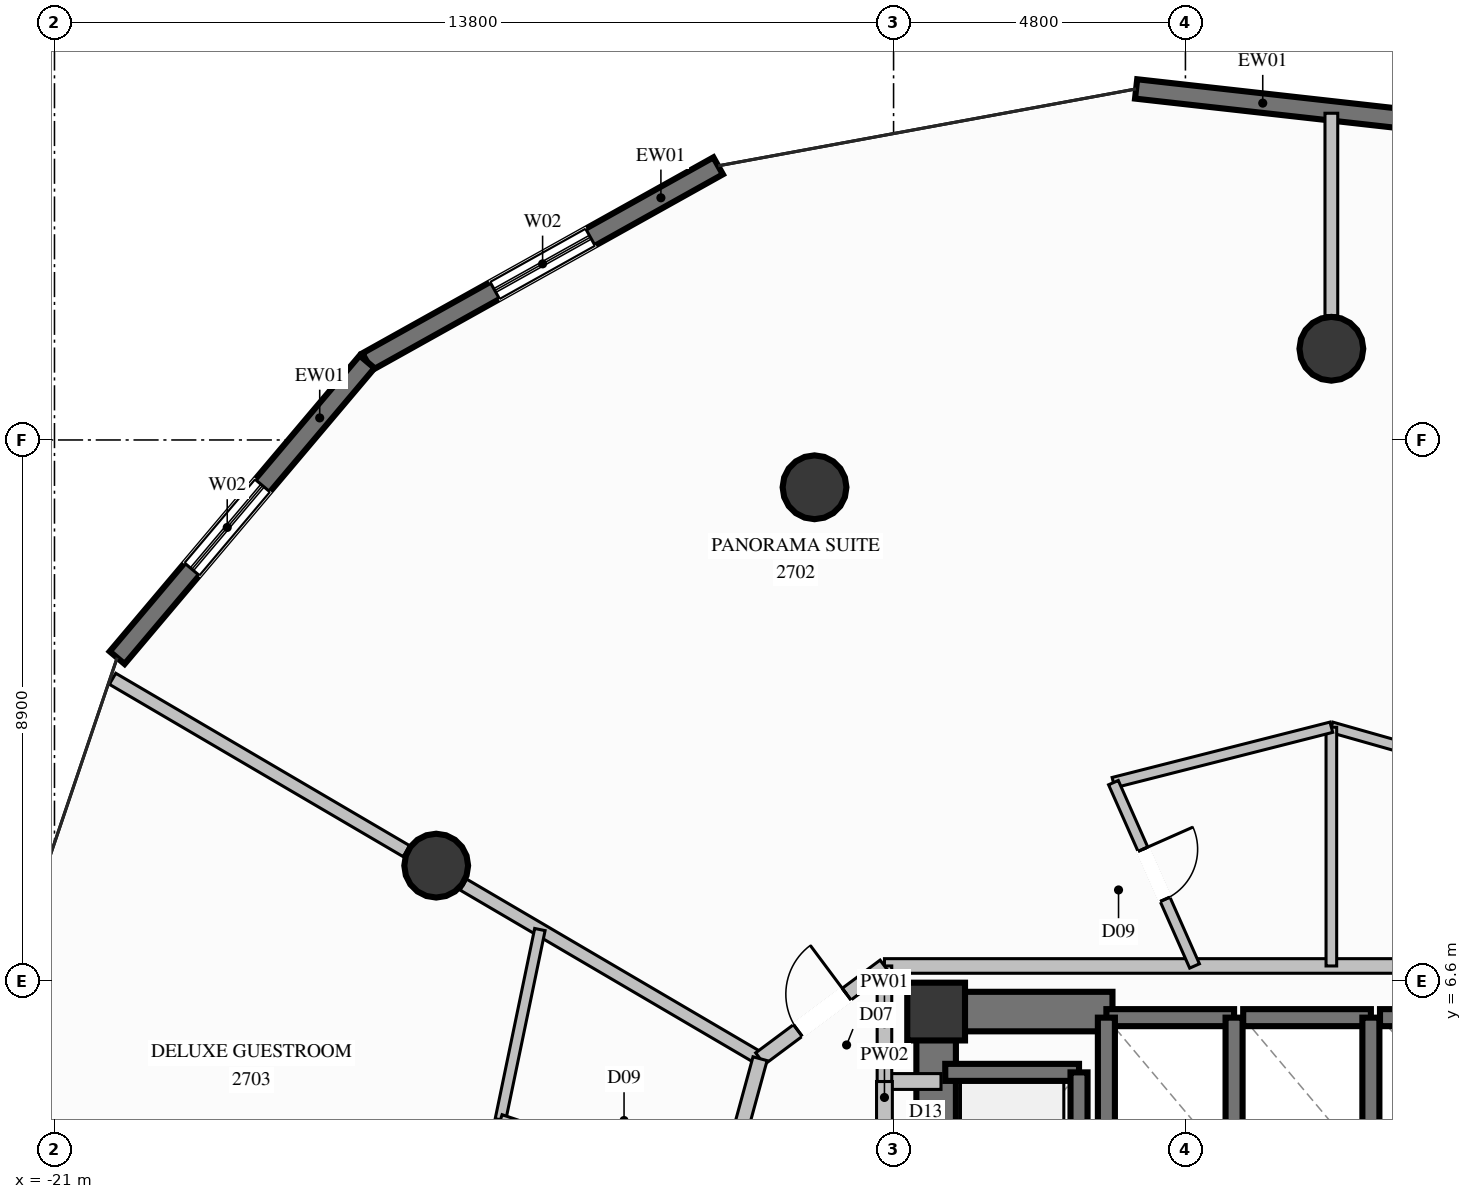
"""IFC4 building model, lengths in metres.
Left out: names, types, materials, properties, quantities, classifications, styles, units other than length and angle.
Written with IfcOpenShell. Run it as: python <this file> out.ifc"""

import sys

from ifc_helpers import new_model, si_unit, direction, frame, frame_2d, origin, origin_2d, place, context, subcontext, project, spatial, rectangle, circle, extrude, element, fill, save


model = new_model("IFC4")
c1 = context("Model", 3, precision=1e-05, world=origin(), true_north=direction((0.0, 1.0)))
c2 = subcontext(c1, "Body", "Model", "MODEL_VIEW")
j1 = project(units=[si_unit("LENGTHUNIT", "METRE"), si_unit("PLANEANGLEUNIT", "RADIAN")], contexts=[c1])
p1 = place(None, origin())
s1 = spatial("IfcSite", under=j1, at=p1, CompositionType="ELEMENT")
p2 = place(p1, origin())
s2 = spatial("IfcBuilding", under=s1, at=p2, CompositionType="ELEMENT")
p3 = place(p2, frame((0.0, 0.0, 102.6)))
s3 = spatial("IfcBuildingStorey", under=s2, at=p3, CompositionType="ELEMENT", Elevation=102.6)
p4 = place(p3, frame((-6.5, 6.1, 0.0), z_axis=(0.0, 0.0, 1.0), x_axis=(1.0, 0.0, 0.0)))
e1 = element("IfcColumn", 1, at=p4, inside=s3, PredefinedType="COLUMN", context=c2, shape_type="SweptSolid", body=[
    extrude(rectangle(XDim=0.95, YDim=0.95, at=origin_2d()), origin(), (0.0, 0.0, 1.0), 3.6),
])
p5 = place(p3, frame((-6.175, 6.1, 0.0), z_axis=(0.0, 0.0, 1.0), x_axis=(1.0, 0.0, 0.0)))
e2 = element("IfcWall", 2, at=p5, inside=s3, PredefinedType="SHEAR", context=c2, shape_type="SweptSolid", body=[
    extrude(rectangle(XDim=2.575, YDim=0.65, at=frame_2d((1.288, 0.0))), origin(), (0.0, 0.0, 1.0), 3.6),
])
p6 = place(p3, frame((-6.5, 2.35, 0.0), z_axis=(0.0, 0.0, 1.0), x_axis=(0.0, 1.0, 0.0)))
e3 = element("IfcWall", 3, at=p6, inside=s3, PredefinedType="SHEAR", context=c2, shape_type="SweptSolid", body=[
    extrude(rectangle(XDim=4.075, YDim=0.65, at=frame_2d((2.038, 0.0))), origin(), (0.0, 0.0, 1.0), 3.6),
])
for number, where, z_axis, x_axis in (
    (4, (0.0, 17.0, 0.0), (0.0, 0.0, 1.0), (1.0, 0.0, 0.0)),
    (5, (-8.5, 14.722, 0.0), (0.0, 0.0, 1.0), (1.0, 0.0, 0.0)),
    (6, (-14.722, 8.5, 0.0), (0.0, 0.0, 1.0), (1.0, 0.0, 0.0)),
):
    element("IfcColumn", number, at=place(p3, frame(where, z_axis=z_axis, x_axis=x_axis)), inside=s3, PredefinedType="COLUMN", context=c2, shape_type="SweptSolid", body=[
        extrude(circle(Radius=0.525, at=origin_2d()), origin(), (0.0, 0.0, 1.0), 3.6),
    ])
p7 = place(p3, frame((-3.211, 21.273, 0.0), z_axis=(0.0, 0.0, 1.0), x_axis=(0.993784044115, -0.111325081016, 0.0)))
e7 = element("IfcWall", 7, at=p7, inside=s3, PredefinedType="SOLIDWALL", context=c2, shape_type="SweptSolid", body=[
    extrude(rectangle(XDim=7.347, YDim=0.32, at=frame_2d((3.673, 0.0))), origin(), (0.0, 0.0, 1.0), 3.35),
])
p8 = place(p7, frame((4.441, 0.0, 0.35)))
e8 = element("IfcOpeningElement", 8, at=p8, cuts=e7, PredefinedType="OPENING", context=c2, shape_type="SweptSolid", body=[
    extrude(rectangle(XDim=1.8, YDim=2.6, at=frame_2d((0.9, 1.3))), frame((0.0, 0.17, 0.0), z_axis=(0.0, -1.0, 0.0), x_axis=(1.0, 0.0, 0.0)), (0.0, 0.0, 1.0), 0.34),
])
p9 = place(p3, frame((-15.859, 16.785, 0.0), z_axis=(0.0, 0.0, 1.0), x_axis=(0.873166276034, 0.487422459882, 0.0)))
e9 = element("IfcWall", 9, at=p9, inside=s3, PredefinedType="SOLIDWALL", context=c2, shape_type="SweptSolid", body=[
    extrude(rectangle(XDim=6.613, YDim=0.32, at=frame_2d((3.306, 0.0))), origin(), (0.0, 0.0, 1.0), 3.35),
])
p10 = place(p9, frame((2.406, 0.0, 0.35)))
e10 = element("IfcOpeningElement", 10, at=p10, cuts=e9, PredefinedType="OPENING", context=c2, shape_type="SweptSolid", body=[
    extrude(rectangle(XDim=1.8, YDim=2.6, at=frame_2d((0.9, 1.3))), frame((0.0, 0.17, 0.0), z_axis=(0.0, -1.0, 0.0), x_axis=(1.0, 0.0, 0.0)), (0.0, 0.0, 1.0), 0.34),
])
p11 = place(p3, frame((-19.969, 11.919, 0.0), z_axis=(0.0, 0.0, 1.0), x_axis=(0.645278763483, 0.763947195425, 0.0)))
e11 = element("IfcWall", 11, at=p11, inside=s3, PredefinedType="SOLIDWALL", context=c2, shape_type="SweptSolid", body=[
    extrude(rectangle(XDim=6.369, YDim=0.32, at=frame_2d((3.185, 0.0))), origin(), (0.0, 0.0, 1.0), 3.35),
])
p12 = place(p11, frame((1.905, 0.0, 0.35)))
e12 = element("IfcOpeningElement", 12, at=p12, cuts=e11, PredefinedType="OPENING", context=c2, shape_type="SweptSolid", body=[
    extrude(rectangle(XDim=1.8, YDim=2.6, at=frame_2d((0.9, 1.3))), frame((0.0, 0.17, 0.0), z_axis=(0.0, -1.0, 0.0), x_axis=(1.0, 0.0, 0.0)), (0.0, 0.0, 1.0), 0.34),
])
p13 = place(p3, frame((-1.6, 6.0, 0.0), z_axis=(0.0, 0.0, 1.0), x_axis=(-1.0, 0.0, 0.0)))
e13 = element("IfcWall", 13, at=p13, inside=s3, PredefinedType="SOLIDWALL", context=c2, shape_type="SweptSolid", body=[
    extrude(rectangle(XDim=2.1, YDim=0.28, at=frame_2d((1.05, 0.0))), origin(), (0.0, 0.0, 1.0), 3.35),
])
for number, where, z_axis, x_axis in (
    (14, (-3.7, 6.0, 0.0), (0.0, 0.0, 1.0), (0.0, -1.0, 0.0)),
    (15, (-1.6, 3.5, 0.0), (0.0, 0.0, 1.0), (0.0, 1.0, 0.0)),
):
    element("IfcWall", number, at=place(p3, frame(where, z_axis=z_axis, x_axis=x_axis)), inside=s3, PredefinedType="SOLIDWALL", context=c2, shape_type="SweptSolid", body=[
        extrude(rectangle(XDim=2.5, YDim=0.28, at=frame_2d((1.25, 0.0))), origin(), (0.0, 0.0, 1.0), 3.35),
    ])
p14 = place(p3, frame((0.65, 6.0, 0.0), z_axis=(0.0, 0.0, 1.0), x_axis=(-1.0, 0.0, 0.0)))
e16 = element("IfcWall", 16, at=p14, inside=s3, PredefinedType="SOLIDWALL", context=c2, shape_type="SweptSolid", body=[
    extrude(rectangle(XDim=2.1, YDim=0.28, at=frame_2d((1.05, 0.0))), origin(), (0.0, 0.0, 1.0), 3.35),
])
p15 = place(p3, frame((0.65, 3.5, 0.0), z_axis=(0.0, 0.0, 1.0), x_axis=(0.0, 1.0, 0.0)))
e17 = element("IfcWall", 17, at=p15, inside=s3, PredefinedType="SOLIDWALL", context=c2, shape_type="SweptSolid", body=[
    extrude(rectangle(XDim=2.5, YDim=0.28, at=frame_2d((1.25, 0.0))), origin(), (0.0, 0.0, 1.0), 3.35),
])
p16 = place(p3, frame((3.0, 6.0, 0.0), z_axis=(0.0, 0.0, 1.0), x_axis=(-1.0, 0.0, 0.0)))
e18 = element("IfcWall", 18, at=p16, inside=s3, PredefinedType="SOLIDWALL", context=c2, shape_type="SweptSolid", body=[
    extrude(rectangle(XDim=2.2, YDim=0.28, at=frame_2d((1.1, 0.0))), origin(), (0.0, 0.0, 1.0), 3.35),
])
p17 = place(p3, frame((-4.15, 5.1, 0.0), z_axis=(0.0, 0.0, 1.0), x_axis=(-1.0, 0.0, 0.0)))
e19 = element("IfcWall", 19, at=p17, inside=s3, PredefinedType="SOLIDWALL", context=c2, shape_type="SweptSolid", body=[
    extrude(rectangle(XDim=2.2, YDim=0.28, at=frame_2d((1.1, 0.0))), origin(), (0.0, 0.0, 1.0), 3.35),
])
p18 = place(p3, frame((-4.15, 2.4, 0.0), z_axis=(0.0, 0.0, 1.0), x_axis=(0.0, 1.0, 0.0)))
e20 = element("IfcWall", 20, at=p18, inside=s3, PredefinedType="SOLIDWALL", context=c2, shape_type="SweptSolid", body=[
    extrude(rectangle(XDim=2.7, YDim=0.28, at=frame_2d((1.35, 0.0))), origin(), (0.0, 0.0, 1.0), 3.35),
])
p19 = place(p3, frame((-7.35, 4.95, 0.0), z_axis=(0.0, 0.0, 1.0), x_axis=(1.0, 0.0, 0.0)))
e21 = element("IfcWall", 21, at=p19, inside=s3, PredefinedType="PARTITIONING", context=c2, shape_type="SweptSolid", body=[
    extrude(rectangle(XDim=0.93, YDim=0.26, at=frame_2d((0.465, 0.0))), origin(), (0.0, 0.0, 1.0), 3.35),
])
p20 = place(p3, frame((-7.35, 2.55, 0.0), z_axis=(0.0, 0.0, 1.0), x_axis=(0.0, 1.0, 0.0)))
e22 = element("IfcWall", 22, at=p20, inside=s3, PredefinedType="PARTITIONING", context=c2, shape_type="SweptSolid", body=[
    extrude(rectangle(XDim=2.4, YDim=0.26, at=frame_2d((1.2, 0.0))), origin(), (0.0, 0.0, 1.0), 2.435),
])
p21 = place(p20, frame((0.775, 0.0, 0.0)))
e23 = element("IfcOpeningElement", 23, at=p21, cuts=e22, PredefinedType="OPENING", context=c2, shape_type="SweptSolid", body=[
    extrude(rectangle(XDim=0.85, YDim=2.05, at=frame_2d((0.425, 1.025))), frame((0.0, 0.14, 0.0), z_axis=(0.0, -1.0, 0.0), x_axis=(1.0, 0.0, 0.0)), (0.0, 0.0, 1.0), 0.28),
])
p22 = place(p3, frame((-7.35, 6.85, 0.0), z_axis=(0.0, 0.0, 1.0), x_axis=(1.0, 0.0, 0.0)))
e24 = element("IfcWall", 24, at=p22, inside=s3, PredefinedType="PARTITIONING", context=c2, shape_type="SweptSolid", body=[
    extrude(rectangle(XDim=14.7, YDim=0.24, at=frame_2d((7.35, 0.0))), origin(), (0.0, 0.0, 1.0), 2.435),
])
p23 = place(p3, frame((-7.35, 4.95, 0.0), z_axis=(0.0, 0.0, 1.0), x_axis=(0.0, 1.0, 0.0)))
e25 = element("IfcWall", 25, at=p23, inside=s3, PredefinedType="PARTITIONING", context=c2, shape_type="SweptSolid", body=[
    extrude(rectangle(XDim=1.9, YDim=0.24, at=frame_2d((0.95, 0.0))), origin(), (0.0, 0.0, 1.0), 2.435),
])
p24 = place(p3, frame((-9.396, 5.325, 0.0), z_axis=(0.0, 0.0, 1.0), x_axis=(-0.862467386777, 0.50611264235, 0.0)))
e26 = element("IfcWall", 26, at=p24, inside=s3, PredefinedType="PARTITIONING", context=c2, shape_type="SweptSolid", body=[
    extrude(rectangle(XDim=5.657, YDim=0.21, at=frame_2d((2.829, 0.0))), origin(), (0.0, 0.0, 1.0), 2.791),
])
p25 = place(p3, frame((-15.212, 8.738, 0.0), z_axis=(0.0, 0.0, 1.0), x_axis=(-0.862556345738, 0.505961016706, 0.0)))
e27 = element("IfcWall", 27, at=p25, inside=s3, PredefinedType="PARTITIONING", context=c2, shape_type="SweptSolid", body=[
    extrude(rectangle(XDim=5.603, YDim=0.21, at=frame_2d((2.802, 0.0))), origin(), (0.0, 0.0, 1.0), 3.35),
])
p26 = place(p3, frame((0.0, 10.776, 0.0), z_axis=(0.0, 0.0, 1.0), x_axis=(0.962140957865, -0.272552338459, 0.0)))
e28 = element("IfcWall", 28, at=p26, inside=s3, PredefinedType="PLUMBINGWALL", context=c2, shape_type="SweptSolid", body=[
    extrude(rectangle(XDim=3.599, YDim=0.175, at=frame_2d((1.8, 0.0))), origin(), (0.0, 0.0, 1.0), 2.985),
])
p27 = place(p3, frame((0.0, 10.776, 0.0), z_axis=(0.0, 0.0, 1.0), x_axis=(0.0, -1.0, 0.0)))
e29 = element("IfcWall", 29, at=p27, inside=s3, PredefinedType="PLUMBINGWALL", context=c2, shape_type="SweptSolid", body=[
    extrude(rectangle(XDim=3.926, YDim=0.175, at=frame_2d((1.963, 0.0))), origin(), (0.0, 0.0, 1.0), 3.35),
])
p28 = place(p3, frame((0.0, 17.545, 0.0), z_axis=(0.0, 0.0, 1.0), x_axis=(0.0, 1.0, 0.0)))
e30 = element("IfcWall", 30, at=p28, inside=s3, PredefinedType="PARTITIONING", context=c2, shape_type="SweptSolid", body=[
    extrude(rectangle(XDim=3.328, YDim=0.21, at=frame_2d((1.664, 0.0))), origin(), (0.0, 0.0, 1.0), 3.35),
])
p29 = place(p3, frame((-3.584, 9.865, 0.0), z_axis=(0.0, 0.0, 1.0), x_axis=(0.969187500781, 0.246324152957, 0.0)))
e31 = element("IfcWall", 31, at=p29, inside=s3, PredefinedType="PLUMBINGWALL", context=c2, shape_type="SweptSolid", body=[
    extrude(rectangle(XDim=3.698, YDim=0.175, at=frame_2d((1.849, 0.0))), origin(), (0.0, 0.0, 1.0), 2.985),
])
p30 = place(p3, frame((-3.584, 9.865, 0.0), z_axis=(0.0, 0.0, 1.0), x_axis=(0.404626310395, -0.914482120621, 0.0)))
e32 = element("IfcWall", 32, at=p30, inside=s3, PredefinedType="PLUMBINGWALL", context=c2, shape_type="SweptSolid", body=[
    extrude(rectangle(XDim=3.297, YDim=0.175, at=frame_2d((1.648, 0.0))), origin(), (0.0, 0.0, 1.0), 3.35),
])
p31 = place(p30, frame((1.198, 0.0, 0.0)))
e33 = element("IfcOpeningElement", 33, at=p31, cuts=e32, PredefinedType="OPENING", context=c2, shape_type="SweptSolid", body=[
    extrude(rectangle(XDim=0.9, YDim=2.1, at=frame_2d((0.45, 1.05))), frame((0.0, 0.098, 0.0), z_axis=(0.0, -1.0, 0.0), x_axis=(1.0, 0.0, 0.0)), (0.0, 0.0, 1.0), 0.195),
])
p32 = place(p3, frame((-9.396, 5.325, 0.0), z_axis=(0.0, 0.0, 1.0), x_axis=(0.8017416961, 0.597670689205, 0.0)))
e34 = element("IfcWall", 34, at=p32, inside=s3, PredefinedType="PARTITIONING", context=c2, shape_type="SweptSolid", body=[
    extrude(rectangle(XDim=2.552, YDim=0.24, at=frame_2d((1.276, 0.0))), origin(), (0.0, 0.0, 1.0), 3.35),
])
p33 = place(p32, frame((0.776, 0.0, 0.0)))
e35 = element("IfcOpeningElement", 35, at=p33, cuts=e34, PredefinedType="OPENING", context=c2, shape_type="SweptSolid", body=[
    extrude(rectangle(XDim=1.0, YDim=2.2, at=frame_2d((0.5, 1.1))), frame((0.0, 0.13, 0.0), z_axis=(0.0, -1.0, 0.0), x_axis=(1.0, 0.0, 0.0)), (0.0, 0.0, 1.0), 0.26),
])
p34 = place(p3, frame((-9.396, 5.325, 0.0), z_axis=(0.0, 0.0, 1.0), x_axis=(-0.263643210908, -0.964620265878, 0.0)))
e36 = element("IfcWall", 36, at=p34, inside=s3, PredefinedType="PARTITIONING", context=c2, shape_type="SweptSolid", body=[
    extrude(rectangle(XDim=2.318, YDim=0.24, at=frame_2d((1.159, 0.0))), origin(), (0.0, 0.0, 1.0), 3.35),
])
p35 = place(p3, frame((-13.017, 7.449, 0.0), z_axis=(0.0, 0.0, 1.0), x_axis=(-0.203136275653, -0.979150475419, 0.0)))
e37 = element("IfcWall", 37, at=p35, inside=s3, PredefinedType="PLUMBINGWALL", context=c2, shape_type="SweptSolid", body=[
    extrude(rectangle(XDim=3.195, YDim=0.175, at=frame_2d((1.597, 0.0))), origin(), (0.0, 0.0, 1.0), 3.35),
])
p36 = place(p3, frame((-10.007, 3.089, 0.0), z_axis=(0.0, 0.0, 1.0), x_axis=(-0.947724103288, 0.319090933822, 0.0)))
e38 = element("IfcWall", 38, at=p36, inside=s3, PredefinedType="PLUMBINGWALL", context=c2, shape_type="SweptSolid", body=[
    extrude(rectangle(XDim=3.861, YDim=0.175, at=frame_2d((1.93, 0.0))), origin(), (0.0, 0.0, 1.0), 3.35),
])
p37 = place(p36, frame((1.48, 0.0, 0.0)))
e39 = element("IfcOpeningElement", 39, at=p37, cuts=e38, PredefinedType="OPENING", context=c2, shape_type="SweptSolid", body=[
    extrude(rectangle(XDim=0.9, YDim=2.1, at=frame_2d((0.45, 1.05))), frame((0.0, 0.098, 0.0), z_axis=(0.0, -1.0, 0.0), x_axis=(1.0, 0.0, 0.0)), (0.0, 0.0, 1.0), 0.195),
])
p38 = place(p10, origin())
e40 = element("IfcWindow", 40, at=p38, inside=s3, PartitioningType="SINGLE_PANEL", PredefinedType="WINDOW", context=c2, shape_type="SweptSolid", body=[
    extrude(rectangle(XDim=1.8, YDim=2.6, at=frame_2d((0.9, 1.3))), frame((0.0, 0.03, 0.0), z_axis=(0.0, -1.0, 0.0), x_axis=(1.0, 0.0, 0.0)), (0.0, 0.0, 1.0), 0.06),
])
fill(e10, e40)
p39 = place(p12, origin())
e41 = element("IfcWindow", 41, at=p39, inside=s3, PartitioningType="SINGLE_PANEL", PredefinedType="WINDOW", context=c2, shape_type="SweptSolid", body=[
    extrude(rectangle(XDim=1.8, YDim=2.6, at=frame_2d((0.9, 1.3))), frame((0.0, 0.03, 0.0), z_axis=(0.0, -1.0, 0.0), x_axis=(1.0, 0.0, 0.0)), (0.0, 0.0, 1.0), 0.06),
])
fill(e12, e41)
p40 = place(p31, origin())
e42 = element("IfcDoor", 42, at=p40, inside=s3, OperationType="SINGLE_SWING_LEFT", PredefinedType="DOOR", context=c2, shape_type="SweptSolid", body=[
    extrude(rectangle(XDim=0.9, YDim=2.1, at=frame_2d((0.45, 1.05))), frame((0.0, 0.025, 0.0), z_axis=(0.0, -1.0, 0.0), x_axis=(1.0, 0.0, 0.0)), (0.0, 0.0, 1.0), 0.05),
])
fill(e33, e42)
p41 = place(p33, origin())
e43 = element("IfcDoor", 43, at=p41, inside=s3, OperationType="SINGLE_SWING_RIGHT", PredefinedType="DOOR", context=c2, shape_type="SweptSolid", body=[
    extrude(rectangle(XDim=1.0, YDim=2.2, at=frame_2d((0.5, 1.1))), frame((0.0, 0.025, 0.0), z_axis=(0.0, -1.0, 0.0), x_axis=(1.0, 0.0, 0.0)), (0.0, 0.0, 1.0), 0.05),
])
fill(e35, e43)
save(model, sys.argv[1])
